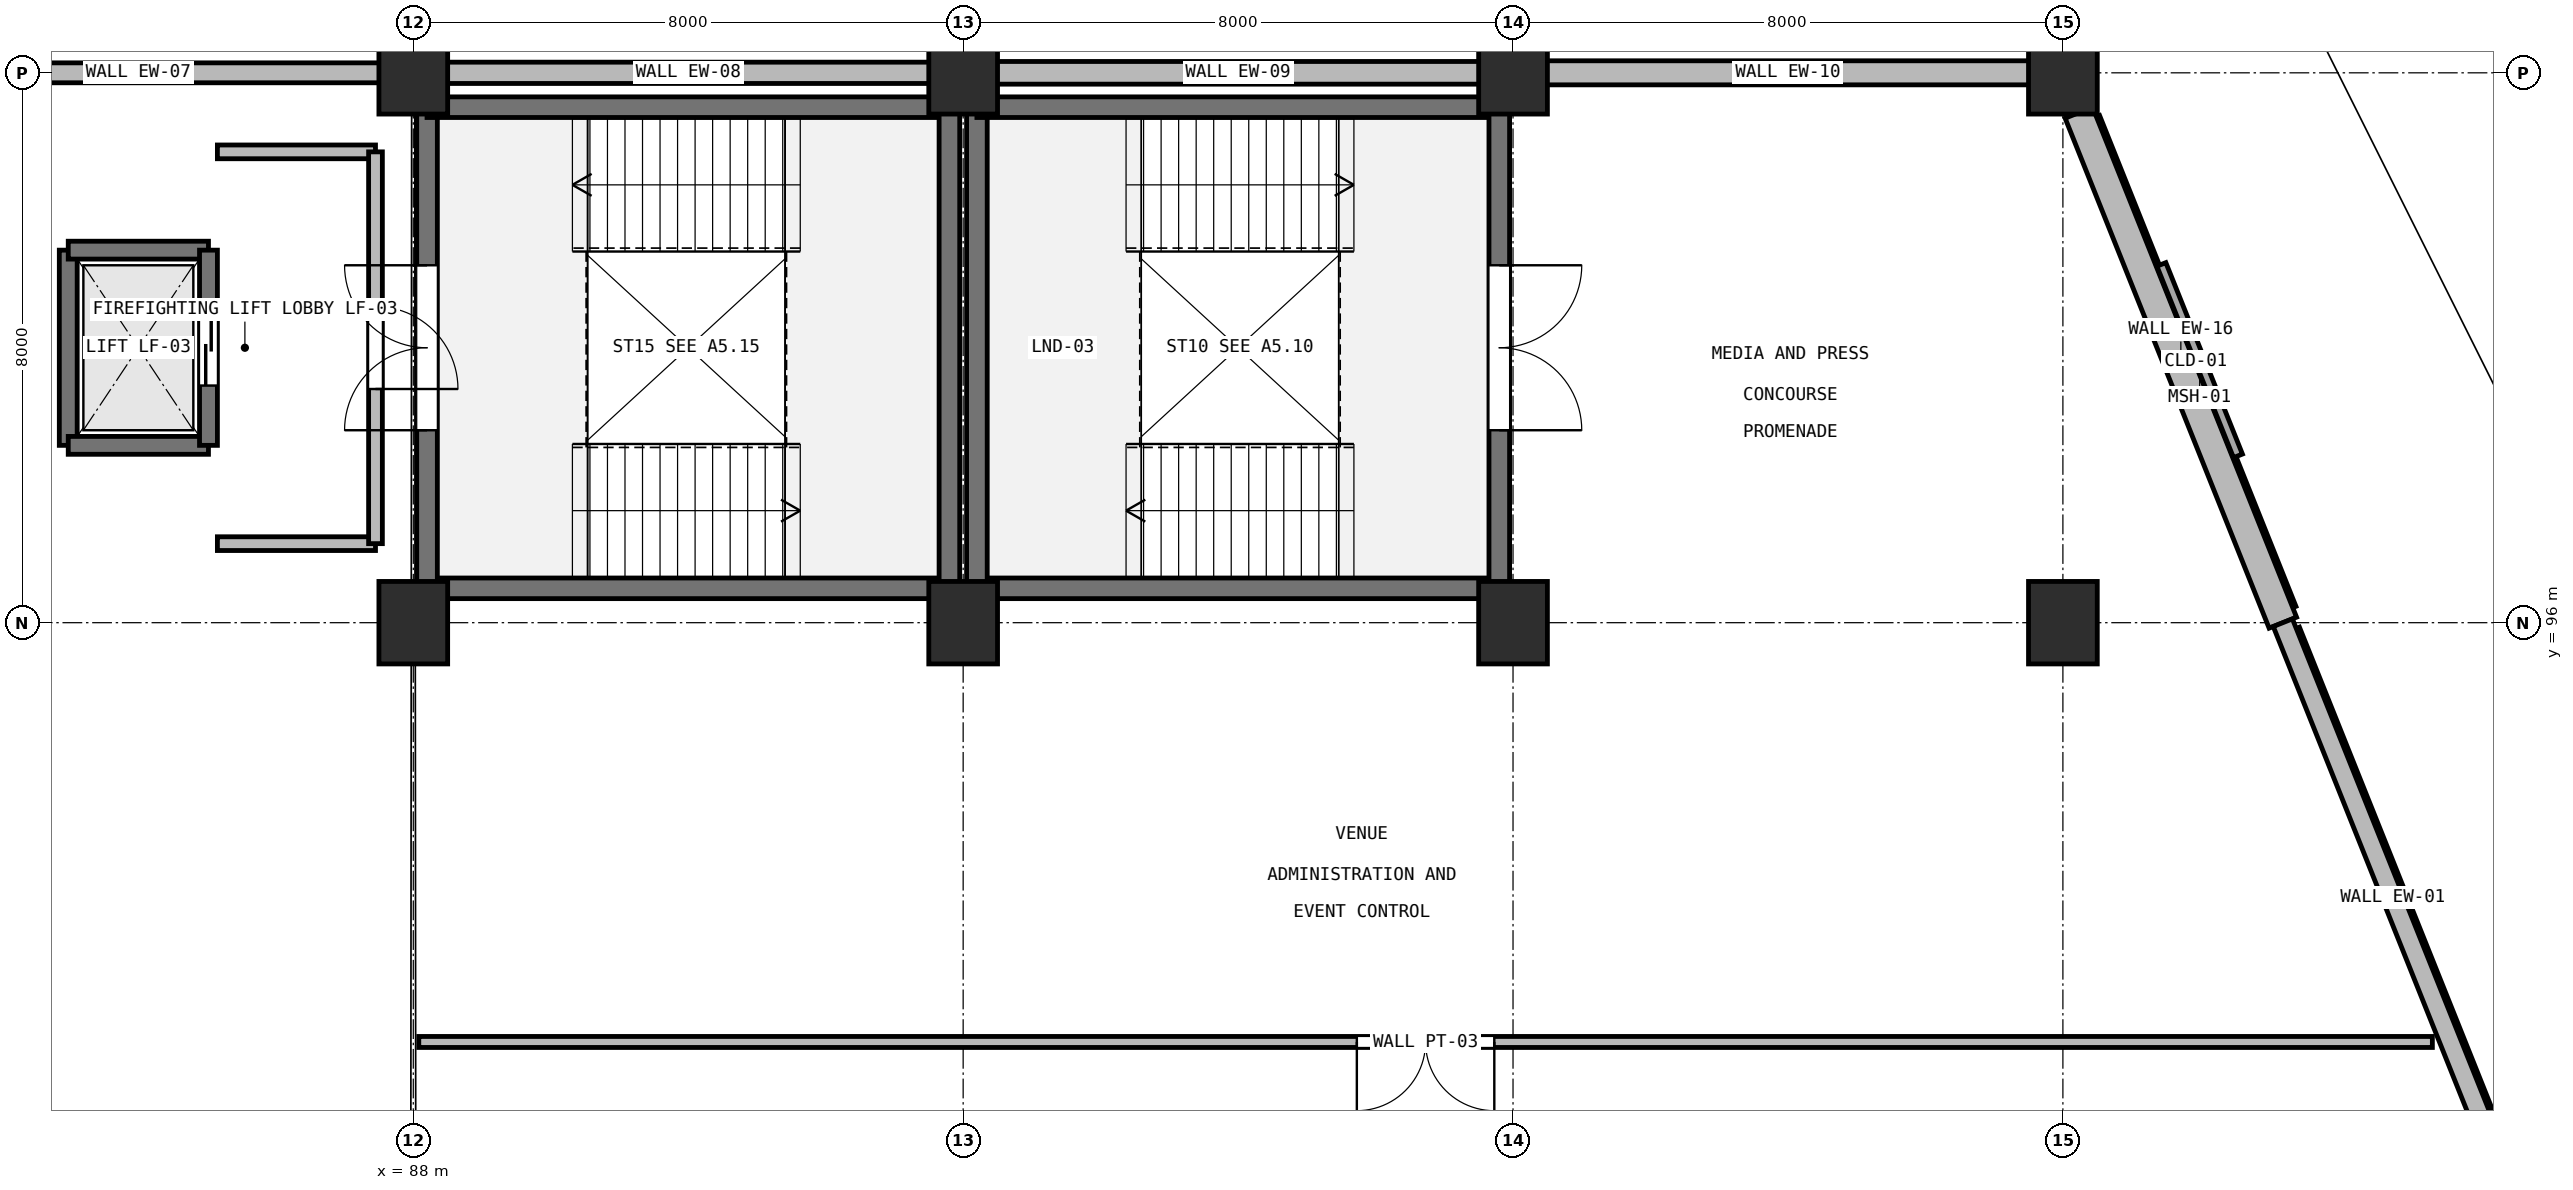
"""IFC4 building model, lengths in metres.
Left out: names, types, materials, properties, quantities, classifications, styles, units other than length and angle.
Written with IfcOpenShell. Run it as: python <this file> out.ifc"""

import sys

from ifc_helpers import new_model, si_unit, direction, frame, frame_2d, origin, origin_2d, place, context, subcontext, project, spatial, rectangle, extrude, element, fill, save


model = new_model("IFC4")
c1 = context("Model", 3, precision=1e-05, world=origin(), true_north=direction((0.0, 1.0)))
c2 = subcontext(c1, "Body", "Model", "MODEL_VIEW")
j1 = project(units=[si_unit("LENGTHUNIT", "METRE"), si_unit("PLANEANGLEUNIT", "RADIAN")], contexts=[c1])
p1 = place(None, origin())
s1 = spatial("IfcSite", under=j1, at=p1, CompositionType="ELEMENT")
p2 = place(p1, origin())
s2 = spatial("IfcBuilding", under=s1, at=p2, CompositionType="ELEMENT")
p3 = place(p2, frame((0.0, 0.0, 19.8)))
s3 = spatial("IfcBuildingStorey", under=s2, at=p3, CompositionType="ELEMENT", Elevation=19.8)
for number, where, z_axis, x_axis in (
    (1, (88.0, 96.0, 0.0), (0.0, 0.0, 1.0), (1.0, 0.0, 0.0)),
    (2, (88.0, 104.0, 0.0), (0.0, 0.0, 1.0), (1.0, 0.0, 0.0)),
    (3, (96.0, 96.0, 0.0), (0.0, 0.0, 1.0), (1.0, 0.0, 0.0)),
    (4, (96.0, 104.0, 0.0), (0.0, 0.0, 1.0), (1.0, 0.0, 0.0)),
    (5, (104.0, 96.0, 0.0), (0.0, 0.0, 1.0), (1.0, 0.0, 0.0)),
    (6, (104.0, 104.0, 0.0), (0.0, 0.0, 1.0), (1.0, 0.0, 0.0)),
    (7, (112.0, 96.0, 0.0), (0.0, 0.0, 1.0), (1.0, 0.0, 0.0)),
    (8, (112.0, 104.0, 0.0), (0.0, 0.0, 1.0), (1.0, 0.0, 0.0)),
):
    element("IfcColumn", number, at=place(p3, frame(where, z_axis=z_axis, x_axis=x_axis)), inside=s3, PredefinedType="COLUMN", context=c2, shape_type="SweptSolid", body=[
        extrude(rectangle(XDim=1.0, YDim=1.2, at=origin_2d()), origin(), (0.0, 0.0, 1.0), 4.8),
    ])
p4 = place(p3, frame((112.232, 103.42, 0.0), z_axis=(0.0, 0.0, 1.0), x_axis=(0.371395943584, -0.928474583976, 0.0)))
e9 = element("IfcWall", 9, at=p4, inside=s3, PredefinedType="SOLIDWALL", context=c2, shape_type="SweptSolid", body=[
    extrude(rectangle(XDim=7.991, YDim=0.43, at=frame_2d((3.996, 0.0))), origin(), (0.0, 0.0, 1.0), 3.45),
])
p5 = place(p3, frame((115.2, 96.0, 0.0), z_axis=(0.0, 0.0, 1.0), x_axis=(0.371385791018, -0.928478645005, 0.0)))
e10 = element("IfcWall", 10, at=p5, inside=s3, PredefinedType="SOLIDWALL", context=c2, shape_type="SweptSolid", body=[
    extrude(rectangle(XDim=8.616, YDim=0.3, at=frame_2d((4.308, 0.0))), origin(), (0.0, 0.0, 1.0), 3.45),
])
p6 = place(p3, frame((80.48, 104.0, 0.0), z_axis=(0.0, 0.0, 1.0), x_axis=(1.0, 0.0, 0.0)))
e11 = element("IfcWall", 11, at=p6, inside=s3, PredefinedType="SOLIDWALL", context=c2, shape_type="SweptSolid", body=[
    extrude(rectangle(XDim=7.04, YDim=0.29, at=frame_2d((3.52, 0.0))), origin(), (0.0, 0.0, 1.0), 3.6),
])
p7 = place(p3, frame((88.48, 104.0, 0.0), z_axis=(0.0, 0.0, 1.0), x_axis=(1.0, 0.0, 0.0)))
e12 = element("IfcWall", 12, at=p7, inside=s3, PredefinedType="SOLIDWALL", context=c2, shape_type="SweptSolid", body=[
    extrude(rectangle(XDim=7.04, YDim=0.31, at=frame_2d((3.52, 0.0))), origin(), (0.0, 0.0, 1.0), 3.6),
])
p8 = place(p3, frame((96.48, 104.0, 0.0), z_axis=(0.0, 0.0, 1.0), x_axis=(1.0, 0.0, 0.0)))
e13 = element("IfcWall", 13, at=p8, inside=s3, PredefinedType="SOLIDWALL", context=c2, shape_type="SweptSolid", body=[
    extrude(rectangle(XDim=7.04, YDim=0.33, at=frame_2d((3.52, 0.0))), origin(), (0.0, 0.0, 1.0), 3.6),
])
p9 = place(p3, frame((104.48, 104.0, 0.0), z_axis=(0.0, 0.0, 1.0), x_axis=(1.0, 0.0, 0.0)))
e14 = element("IfcWall", 14, at=p9, inside=s3, PredefinedType="SOLIDWALL", context=c2, shape_type="SweptSolid", body=[
    extrude(rectangle(XDim=7.04, YDim=0.35, at=frame_2d((3.52, 0.0))), origin(), (0.0, 0.0, 1.0), 3.6),
])
p10 = place(p3, frame((103.8, 96.5, 0.0), z_axis=(0.0, 0.0, 1.0), x_axis=(-1.0, 0.0, 0.0)))
e15 = element("IfcWall", 15, at=p10, inside=s3, PredefinedType="SHEAR", context=c2, shape_type="SweptSolid", body=[
    extrude(rectangle(XDim=7.6, YDim=0.3, at=frame_2d((3.8, 0.0))), origin(), (0.0, 0.0, 1.0), 4.5),
])
p11 = place(p3, frame((96.2, 96.5, 0.0), z_axis=(0.0, 0.0, 1.0), x_axis=(0.0, 1.0, 0.0)))
e16 = element("IfcWall", 16, at=p11, inside=s3, PredefinedType="SHEAR", context=c2, shape_type="SweptSolid", body=[
    extrude(rectangle(XDim=7.0, YDim=0.3, at=frame_2d((3.5, 0.0))), origin(), (0.0, 0.0, 1.0), 4.5),
])
p12 = place(p3, frame((96.2, 103.5, 0.0), z_axis=(0.0, 0.0, 1.0), x_axis=(1.0, 0.0, 0.0)))
e17 = element("IfcWall", 17, at=p12, inside=s3, PredefinedType="SHEAR", context=c2, shape_type="SweptSolid", body=[
    extrude(rectangle(XDim=7.6, YDim=0.3, at=frame_2d((3.8, 0.0))), origin(), (0.0, 0.0, 1.0), 4.5),
])
p13 = place(p3, frame((103.8, 103.5, 0.0), z_axis=(0.0, 0.0, 1.0), x_axis=(0.0, -1.0, 0.0)))
e18 = element("IfcWall", 18, at=p13, inside=s3, PredefinedType="SHEAR", context=c2, shape_type="SweptSolid", body=[
    extrude(rectangle(XDim=7.0, YDim=0.3, at=frame_2d((3.5, 0.0))), origin(), (0.0, 0.0, 1.0), 4.5),
])
p14 = place(p13, frame((2.3, 0.0, 0.0)))
e19 = element("IfcOpeningElement", 19, at=p14, cuts=e18, PredefinedType="OPENING", context=c2, shape_type="SweptSolid", body=[
    extrude(rectangle(XDim=2.4, YDim=2.2, at=frame_2d((1.2, 1.1))), frame((0.0, 0.16, 0.0), z_axis=(0.0, -1.0, 0.0), x_axis=(1.0, 0.0, 0.0)), (0.0, 0.0, 1.0), 0.32),
])
p15 = place(p3, frame((95.8, 96.5, 0.0), z_axis=(0.0, 0.0, 1.0), x_axis=(-1.0, 0.0, 0.0)))
e20 = element("IfcWall", 20, at=p15, inside=s3, PredefinedType="SHEAR", context=c2, shape_type="SweptSolid", body=[
    extrude(rectangle(XDim=7.6, YDim=0.3, at=frame_2d((3.8, 0.0))), origin(), (0.0, 0.0, 1.0), 4.5),
])
p16 = place(p3, frame((88.2, 96.5, 0.0), z_axis=(0.0, 0.0, 1.0), x_axis=(0.0, 1.0, 0.0)))
e21 = element("IfcWall", 21, at=p16, inside=s3, PredefinedType="SHEAR", context=c2, shape_type="SweptSolid", body=[
    extrude(rectangle(XDim=7.0, YDim=0.3, at=frame_2d((3.5, 0.0))), origin(), (0.0, 0.0, 1.0), 4.5),
])
p17 = place(p16, frame((2.3, 0.0, 0.0)))
e22 = element("IfcOpeningElement", 22, at=p17, cuts=e21, PredefinedType="OPENING", context=c2, shape_type="SweptSolid", body=[
    extrude(rectangle(XDim=2.4, YDim=2.2, at=frame_2d((1.2, 1.1))), frame((0.0, 0.16, 0.0), z_axis=(0.0, -1.0, 0.0), x_axis=(1.0, 0.0, 0.0)), (0.0, 0.0, 1.0), 0.32),
])
p18 = place(p3, frame((88.2, 103.5, 0.0), z_axis=(0.0, 0.0, 1.0), x_axis=(1.0, 0.0, 0.0)))
e23 = element("IfcWall", 23, at=p18, inside=s3, PredefinedType="SHEAR", context=c2, shape_type="SweptSolid", body=[
    extrude(rectangle(XDim=7.6, YDim=0.3, at=frame_2d((3.8, 0.0))), origin(), (0.0, 0.0, 1.0), 4.5),
])
p19 = place(p3, frame((95.8, 103.5, 0.0), z_axis=(0.0, 0.0, 1.0), x_axis=(0.0, -1.0, 0.0)))
e24 = element("IfcWall", 24, at=p19, inside=s3, PredefinedType="SHEAR", context=c2, shape_type="SweptSolid", body=[
    extrude(rectangle(XDim=7.0, YDim=0.3, at=frame_2d((3.5, 0.0))), origin(), (0.0, 0.0, 1.0), 4.5),
])
p20 = place(p3, frame((82.98, 98.58, 0.0), z_axis=(0.0, 0.0, 1.0), x_axis=(0.0, 1.0, 0.0)))
e25 = element("IfcWall", 25, at=p20, inside=s3, PredefinedType="SHEAR", context=c2, shape_type="SweptSolid", body=[
    extrude(rectangle(XDim=2.84, YDim=0.26, at=frame_2d((1.42, 0.0))), origin(), (0.0, 0.0, 1.0), 4.5),
])
for number, where, z_axis, x_axis in (
    (26, (82.98, 101.42, 0.0), (0.0, 0.0, 1.0), (1.0, 0.0, 0.0)),
    (27, (85.02, 98.58, 0.0), (0.0, 0.0, 1.0), (-1.0, 0.0, 0.0)),
):
    element("IfcWall", number, at=place(p3, frame(where, z_axis=z_axis, x_axis=x_axis)), inside=s3, PredefinedType="SHEAR", context=c2, shape_type="SweptSolid", body=[
        extrude(rectangle(XDim=2.04, YDim=0.26, at=frame_2d((1.02, 0.0))), origin(), (0.0, 0.0, 1.0), 4.5),
    ])
p21 = place(p3, frame((85.02, 101.42, 0.0), z_axis=(0.0, 0.0, 1.0), x_axis=(0.0, -1.0, 0.0)))
e28 = element("IfcWall", 28, at=p21, inside=s3, PredefinedType="SHEAR", context=c2, shape_type="SweptSolid", body=[
    extrude(rectangle(XDim=2.84, YDim=0.26, at=frame_2d((1.42, 0.0))), origin(), (0.0, 0.0, 1.0), 4.5),
])
p22 = place(p21, frame((0.87, 0.0, 0.0)))
e29 = element("IfcOpeningElement", 29, at=p22, cuts=e28, PredefinedType="OPENING", context=c2, shape_type="SweptSolid", body=[
    extrude(rectangle(XDim=1.1, YDim=2.15, at=frame_2d((0.55, 1.075))), frame((0.0, 0.14, 0.0), z_axis=(0.0, -1.0, 0.0), x_axis=(1.0, 0.0, 0.0)), (0.0, 0.0, 1.0), 0.28),
])
for number, where, z_axis, x_axis in (
    (30, (85.15, 102.85, 0.0), (0.0, 0.0, 1.0), (1.0, 0.0, 0.0)),
    (31, (87.45, 97.15, 0.0), (0.0, 0.0, 1.0), (-1.0, 0.0, 0.0)),
):
    element("IfcWall", number, at=place(p3, frame(where, z_axis=z_axis, x_axis=x_axis)), inside=s3, PredefinedType="PARTITIONING", context=c2, shape_type="SweptSolid", body=[
        extrude(rectangle(XDim=2.3, YDim=0.2, at=frame_2d((1.15, 0.0))), origin(), (0.0, 0.0, 1.0), 4.5),
    ])
p23 = place(p3, frame((87.45, 102.85, 0.0), z_axis=(0.0, 0.0, 1.0), x_axis=(0.0, -1.0, 0.0)))
e32 = element("IfcWall", 32, at=p23, inside=s3, PredefinedType="PARTITIONING", context=c2, shape_type="SweptSolid", body=[
    extrude(rectangle(XDim=5.7, YDim=0.2, at=frame_2d((2.85, 0.0))), origin(), (0.0, 0.0, 1.0), 3.6),
])
p24 = place(p23, frame((2.25, 0.0, 0.0)))
e33 = element("IfcOpeningElement", 33, at=p24, cuts=e32, PredefinedType="OPENING", context=c2, shape_type="SweptSolid", body=[
    extrude(rectangle(XDim=1.2, YDim=2.2, at=frame_2d((0.6, 1.1))), frame((0.0, 0.11, 0.0), z_axis=(0.0, -1.0, 0.0), x_axis=(1.0, 0.0, 0.0)), (0.0, 0.0, 1.0), 0.22),
])
p25 = place(p3, frame((117.375, 89.9, 0.0), z_axis=(0.0, 0.0, 1.0), x_axis=(-1.0, 0.0, 0.0)))
e34 = element("IfcWall", 34, at=p25, inside=s3, PredefinedType="PARTITIONING", context=c2, shape_type="SweptSolid", body=[
    extrude(rectangle(XDim=29.295, YDim=0.16, at=frame_2d((14.647, 0.0))), origin(), (0.0, 0.0, 1.0), 4.5),
])
p26 = place(p25, frame((13.648, 0.0, 0.0)))
e35 = element("IfcOpeningElement", 35, at=p26, cuts=e34, PredefinedType="OPENING", context=c2, shape_type="SweptSolid", body=[
    extrude(rectangle(XDim=2.0, YDim=2.25, at=frame_2d((1.0, 1.125))), frame((0.0, 0.09, 0.0), z_axis=(0.0, -1.0, 0.0), x_axis=(1.0, 0.0, 0.0)), (0.0, 0.0, 1.0), 0.18),
])
p27 = place(p14, frame((2.4, 0.0, 0.0), z_axis=(0.0, 0.0, 1.0), x_axis=(-1.0, 0.0, 0.0)))
e36 = element("IfcDoor", 36, at=p27, inside=s3, OperationType="DOUBLE_DOOR_SINGLE_SWING", PredefinedType="DOOR", context=c2, shape_type="SweptSolid", body=[
    extrude(rectangle(XDim=2.4, YDim=2.2, at=frame_2d((1.2, 1.1))), frame((0.0, 0.025, 0.0), z_axis=(0.0, -1.0, 0.0), x_axis=(1.0, 0.0, 0.0)), (0.0, 0.0, 1.0), 0.05),
])
fill(e19, e36)
p28 = place(p17, frame((2.4, 0.0, 0.0), z_axis=(0.0, 0.0, 1.0), x_axis=(-1.0, 0.0, 0.0)))
e37 = element("IfcDoor", 37, at=p28, inside=s3, OperationType="DOUBLE_DOOR_SINGLE_SWING", PredefinedType="DOOR", context=c2, shape_type="SweptSolid", body=[
    extrude(rectangle(XDim=2.4, YDim=2.2, at=frame_2d((1.2, 1.1))), frame((0.0, 0.025, 0.0), z_axis=(0.0, -1.0, 0.0), x_axis=(1.0, 0.0, 0.0)), (0.0, 0.0, 1.0), 0.05),
])
fill(e22, e37)
p29 = place(p22, origin())
e38 = element("IfcDoor", 38, at=p29, inside=s3, OperationType="SLIDING_TO_LEFT", PredefinedType="DOOR", context=c2, shape_type="SweptSolid", body=[
    extrude(rectangle(XDim=1.1, YDim=2.15, at=frame_2d((0.55, 1.075))), frame((0.0, 0.025, 0.0), z_axis=(0.0, -1.0, 0.0), x_axis=(1.0, 0.0, 0.0)), (0.0, 0.0, 1.0), 0.05),
])
fill(e29, e38)
p30 = place(p24, origin())
e39 = element("IfcDoor", 39, at=p30, inside=s3, OperationType="SINGLE_SWING_RIGHT", PredefinedType="DOOR", context=c2, shape_type="SweptSolid", body=[
    extrude(rectangle(XDim=1.2, YDim=2.2, at=frame_2d((0.6, 1.1))), frame((0.0, 0.025, 0.0), z_axis=(0.0, -1.0, 0.0), x_axis=(1.0, 0.0, 0.0)), (0.0, 0.0, 1.0), 0.05),
])
fill(e33, e39)
p31 = place(p26, origin())
e40 = element("IfcDoor", 40, at=p31, inside=s3, OperationType="DOUBLE_DOOR_SINGLE_SWING", PredefinedType="DOOR", context=c2, shape_type="SweptSolid", body=[
    extrude(rectangle(XDim=2.0, YDim=2.25, at=frame_2d((1.0, 1.125))), frame((0.0, 0.025, 0.0), z_axis=(0.0, -1.0, 0.0), x_axis=(1.0, 0.0, 0.0)), (0.0, 0.0, 1.0), 0.05),
])
fill(e35, e40)
save(model, sys.argv[1])
